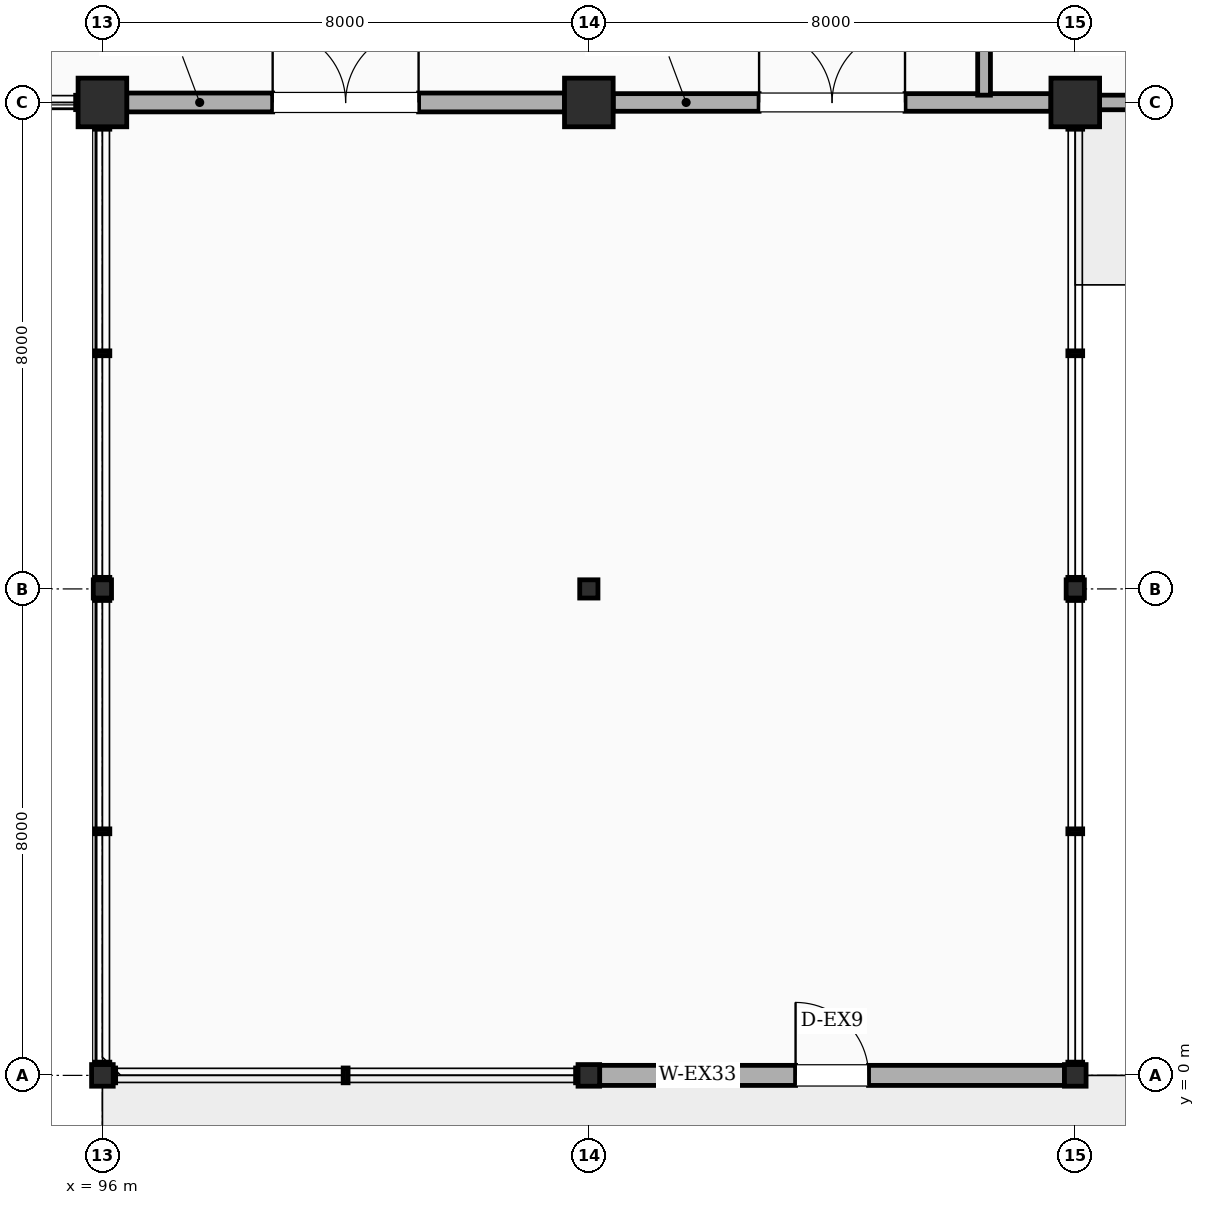
"""IFC4 building model, lengths in metres.
Left out: names, types, materials, properties, quantities, classifications, styles, units other than length and angle.
Written with IfcOpenShell. Run it as: python <this file> out.ifc"""

import sys

from ifc_helpers import new_model, si_unit, direction, frame, frame_2d, origin, origin_2d, place, context, subcontext, project, spatial, rectangle, hollow_circle, i_section, extrude, element, fill, save


model = new_model("IFC4")
c1 = context("Model", 3, precision=1e-05, world=origin(), true_north=direction((0.0, 1.0)))
c2 = subcontext(c1, "Body", "Model", "MODEL_VIEW")
j1 = project(units=[si_unit("LENGTHUNIT", "METRE"), si_unit("PLANEANGLEUNIT", "RADIAN")], contexts=[c1])
p1 = place(None, origin())
s1 = spatial("IfcSite", under=j1, at=p1, CompositionType="ELEMENT")
p2 = place(p1, origin())
s2 = spatial("IfcBuilding", under=s1, at=p2, CompositionType="ELEMENT")
p3 = place(p2, origin())
s3 = spatial("IfcBuildingStorey", under=s2, at=p3, CompositionType="ELEMENT", Elevation=0.0)
p4 = place(p3, frame((96.0, 0.0, 0.0), z_axis=(0.0, 0.0, 1.0), x_axis=(1.0, 0.0, 0.0)))
e1 = element("IfcColumn", 1, at=p4, inside=s3, PredefinedType="COLUMN", context=c2, shape_type="SweptSolid", body=[
    extrude(hollow_circle(Radius=0.178, WallThickness=0.012, at=origin_2d()), origin(), (0.0, 0.0, 1.0), 5.4),
])
p5 = place(p3, frame((96.0, 8.0, 0.0), z_axis=(0.0, 0.0, 1.0), x_axis=(1.0, 0.0, 0.0)))
e2 = element("IfcColumn", 2, at=p5, inside=s3, PredefinedType="COLUMN", context=c2, shape_type="SweptSolid", body=[
    extrude(i_section(OverallWidth=0.3, OverallDepth=0.3, WebThickness=0.011, FlangeThickness=0.019, FilletRadius=0.027, at=origin_2d()), origin(), (0.0, 0.0, 1.0), 5.4),
])
p6 = place(p3, frame((104.0, 0.0, 0.0), z_axis=(0.0, 0.0, 1.0), x_axis=(1.0, 0.0, 0.0)))
e3 = element("IfcColumn", 3, at=p6, inside=s3, PredefinedType="COLUMN", context=c2, shape_type="SweptSolid", body=[
    extrude(hollow_circle(Radius=0.178, WallThickness=0.012, at=origin_2d()), origin(), (0.0, 0.0, 1.0), 5.4),
])
p7 = place(p3, frame((104.0, 8.0, 0.0), z_axis=(0.0, 0.0, 1.0), x_axis=(1.0, 0.0, 0.0)))
e4 = element("IfcColumn", 4, at=p7, inside=s3, PredefinedType="COLUMN", context=c2, shape_type="SweptSolid", body=[
    extrude(i_section(OverallWidth=0.3, OverallDepth=0.3, WebThickness=0.011, FlangeThickness=0.019, FilletRadius=0.027, at=origin_2d()), origin(), (0.0, 0.0, 1.0), 5.4),
])
p8 = place(p3, frame((112.0, 0.0, 0.0), z_axis=(0.0, 0.0, 1.0), x_axis=(1.0, 0.0, 0.0)))
e5 = element("IfcColumn", 5, at=p8, inside=s3, PredefinedType="COLUMN", context=c2, shape_type="SweptSolid", body=[
    extrude(hollow_circle(Radius=0.178, WallThickness=0.012, at=origin_2d()), origin(), (0.0, 0.0, 1.0), 5.4),
])
p9 = place(p3, frame((112.0, 8.0, 0.0), z_axis=(0.0, 0.0, 1.0), x_axis=(1.0, 0.0, 0.0)))
e6 = element("IfcColumn", 6, at=p9, inside=s3, PredefinedType="COLUMN", context=c2, shape_type="SweptSolid", body=[
    extrude(i_section(OverallWidth=0.3, OverallDepth=0.3, WebThickness=0.011, FlangeThickness=0.019, FilletRadius=0.027, at=origin_2d()), origin(), (0.0, 0.0, 1.0), 5.4),
])
for number, where, z_axis, x_axis in (
    (7, (96.0, 16.0, 0.0), (0.0, 0.0, 1.0), (1.0, 0.0, 0.0)),
    (8, (104.0, 16.0, 0.0), (0.0, 0.0, 1.0), (1.0, 0.0, 0.0)),
    (9, (112.0, 16.0, 0.0), (0.0, 0.0, 1.0), (1.0, 0.0, 0.0)),
):
    element("IfcColumn", number, at=place(p3, frame(where, z_axis=z_axis, x_axis=x_axis)), inside=s3, PredefinedType="COLUMN", context=c2, shape_type="SweptSolid", body=[
        extrude(rectangle(XDim=0.8, YDim=0.8, at=origin_2d()), origin(), (0.0, 0.0, 1.0), 5.4),
    ])
p10 = place(p3, frame((96.4, 16.0, 0.0), z_axis=(0.0, 0.0, 1.0), x_axis=(1.0, 0.0, 0.0)))
e10 = element("IfcWall", 10, at=p10, inside=s3, PredefinedType="STANDARD", context=c2, shape_type="SweptSolid", body=[
    extrude(rectangle(XDim=7.2, YDim=0.31, at=frame_2d((3.6, 0.0))), origin(), (0.0, 0.0, 1.0), 4.42),
])
p11 = place(p10, frame((2.4, 0.0, 0.0)))
e11 = element("IfcOpeningElement", 11, at=p11, cuts=e10, PredefinedType="OPENING", context=c2, shape_type="SweptSolid", body=[
    extrude(rectangle(XDim=2.4, YDim=2.6, at=frame_2d((1.2, 1.3))), frame((0.0, 0.165, 0.0), z_axis=(0.0, -1.0, 0.0), x_axis=(1.0, 0.0, 0.0)), (0.0, 0.0, 1.0), 0.33),
])
p12 = place(p3, frame((104.4, 16.0, 0.0), z_axis=(0.0, 0.0, 1.0), x_axis=(1.0, 0.0, 0.0)))
e12 = element("IfcWall", 12, at=p12, inside=s3, PredefinedType="STANDARD", context=c2, shape_type="SweptSolid", body=[
    extrude(rectangle(XDim=7.2, YDim=0.29, at=frame_2d((3.6, 0.0))), origin(), (0.0, 0.0, 1.0), 4.42),
])
p13 = place(p12, frame((2.4, 0.0, 0.0)))
e13 = element("IfcOpeningElement", 13, at=p13, cuts=e12, PredefinedType="OPENING", context=c2, shape_type="SweptSolid", body=[
    extrude(rectangle(XDim=2.4, YDim=2.6, at=frame_2d((1.2, 1.3))), frame((0.0, 0.155, 0.0), z_axis=(0.0, -1.0, 0.0), x_axis=(1.0, 0.0, 0.0)), (0.0, 0.0, 1.0), 0.31),
])
p14 = place(p3, frame((112.4, 16.0, 0.0), z_axis=(0.0, 0.0, 1.0), x_axis=(1.0, 0.0, 0.0)))
e14 = element("IfcWall", 14, at=p14, inside=s3, PredefinedType="SOLIDWALL", context=c2, shape_type="SweptSolid", body=[
    extrude(rectangle(XDim=7.25, YDim=0.24, at=frame_2d((3.625, 0.0))), origin(), (0.0, 0.0, 1.0), 4.42),
])
p15 = place(p14, frame((2.625, 0.0, 0.0)))
e15 = element("IfcOpeningElement", 15, at=p15, cuts=e14, PredefinedType="OPENING", context=c2, shape_type="SweptSolid", body=[
    extrude(rectangle(XDim=2.0, YDim=2.4, at=frame_2d((1.0, 1.2))), frame((0.0, 0.13, 0.0), z_axis=(0.0, -1.0, 0.0), x_axis=(1.0, 0.0, 0.0)), (0.0, 0.0, 1.0), 0.26),
])
p16 = place(p3, frame((104.178, 0.0, 0.0), z_axis=(0.0, 0.0, 1.0), x_axis=(1.0, 0.0, 0.0)))
e16 = element("IfcWall", 16, at=p16, inside=s3, PredefinedType="STANDARD", context=c2, shape_type="SweptSolid", body=[
    extrude(rectangle(XDim=7.645, YDim=0.33, at=frame_2d((3.822, 0.0))), origin(), (0.0, 0.0, 1.0), 5.1),
])
p17 = place(p16, frame((3.222, 0.0, 0.0)))
e17 = element("IfcOpeningElement", 17, at=p17, cuts=e16, PredefinedType="OPENING", context=c2, shape_type="SweptSolid", body=[
    extrude(rectangle(XDim=1.2, YDim=2.2, at=frame_2d((0.6, 1.1))), frame((0.0, 0.175, 0.0), z_axis=(0.0, -1.0, 0.0), x_axis=(1.0, 0.0, 0.0)), (0.0, 0.0, 1.0), 0.35),
])
p18 = place(p3, frame((110.5, 16.12, 0.0), z_axis=(0.0, 0.0, 1.0), x_axis=(0.0, 1.0, 0.0)))
e18 = element("IfcWall", 18, at=p18, inside=s3, PredefinedType="SOLIDWALL", context=c2, shape_type="SweptSolid", body=[
    extrude(rectangle(XDim=5.66, YDim=0.21, at=frame_2d((2.83, 0.0))), origin(), (0.0, 0.0, 1.0), 4.42),
])
p19 = place(p18, frame((2.23, 0.0, 0.0)))
e19 = element("IfcOpeningElement", 19, at=p19, cuts=e18, PredefinedType="OPENING", context=c2, shape_type="SweptSolid", body=[
    extrude(rectangle(XDim=1.2, YDim=2.15, at=frame_2d((0.6, 1.075))), frame((0.0, 0.115, 0.0), z_axis=(0.0, -1.0, 0.0), x_axis=(1.0, 0.0, 0.0)), (0.0, 0.0, 1.0), 0.23),
])
p20 = place(p11, frame((2.4, 0.0, 0.0), z_axis=(0.0, 0.0, 1.0), x_axis=(-1.0, 0.0, 0.0)))
e20 = element("IfcDoor", 20, at=p20, inside=s3, OperationType="DOUBLE_DOOR_SINGLE_SWING", PredefinedType="DOOR", context=c2, shape_type="SweptSolid", body=[
    extrude(rectangle(XDim=2.4, YDim=2.6, at=frame_2d((-1.2, 1.3))), frame((0.0, -0.025, 0.0), z_axis=(0.0, 1.0, 0.0), x_axis=(-1.0, 0.0, 0.0)), (0.0, 0.0, 1.0), 0.05),
])
fill(e11, e20)
p21 = place(p13, frame((2.4, 0.0, 0.0), z_axis=(0.0, 0.0, 1.0), x_axis=(-1.0, 0.0, 0.0)))
e21 = element("IfcDoor", 21, at=p21, inside=s3, OperationType="DOUBLE_DOOR_SINGLE_SWING", PredefinedType="DOOR", context=c2, shape_type="SweptSolid", body=[
    extrude(rectangle(XDim=2.4, YDim=2.6, at=frame_2d((-1.2, 1.3))), frame((0.0, -0.025, 0.0), z_axis=(0.0, 1.0, 0.0), x_axis=(-1.0, 0.0, 0.0)), (0.0, 0.0, 1.0), 0.05),
])
fill(e13, e21)
p22 = place(p17, frame((1.2, 0.0, 0.0), z_axis=(0.0, 0.0, 1.0), x_axis=(-1.0, 0.0, 0.0)))
e22 = element("IfcDoor", 22, at=p22, inside=s3, OperationType="SINGLE_SWING_LEFT", PredefinedType="DOOR", context=c2, shape_type="SweptSolid", body=[
    extrude(rectangle(XDim=1.2, YDim=2.2, at=frame_2d((-0.6, 1.1))), frame((0.0, -0.025, 0.0), z_axis=(0.0, 1.0, 0.0), x_axis=(-1.0, 0.0, 0.0)), (0.0, 0.0, 1.0), 0.05),
])
fill(e17, e22)
save(model, sys.argv[1])
